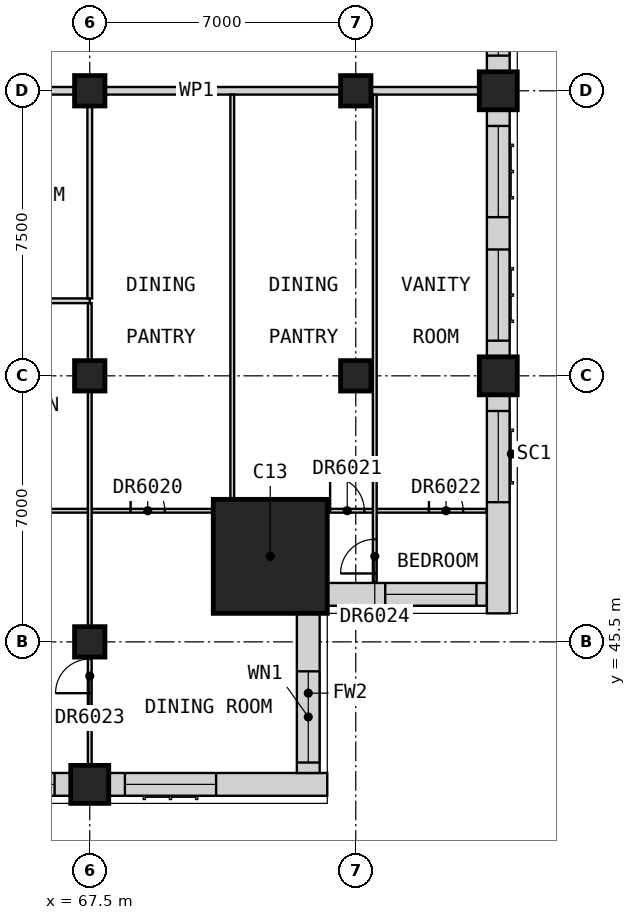
"""IFC4 building model, lengths in metres.
Left out: names, types, materials, properties, quantities, classifications, styles, units other than length and angle.
Written with IfcOpenShell. Run it as: python <this file> out.ifc"""

import sys

from ifc_helpers import new_model, si_unit, direction, frame, frame_2d, origin, origin_2d, place, context, subcontext, project, spatial, rectangle, extrude, element, fill, save


model = new_model("IFC4")
c1 = context("Model", 3, precision=1e-05, world=origin(), true_north=direction((0.0, 1.0)))
c2 = subcontext(c1, "Body", "Model", "MODEL_VIEW")
j1 = project(units=[si_unit("LENGTHUNIT", "METRE"), si_unit("PLANEANGLEUNIT", "RADIAN")], contexts=[c1])
p1 = place(None, origin())
s1 = spatial("IfcSite", under=j1, at=p1, CompositionType="ELEMENT")
p2 = place(p1, origin())
s2 = spatial("IfcBuilding", under=s1, at=p2, CompositionType="ELEMENT")
p3 = place(p2, frame((0.0, 0.0, 254.7)))
s3 = spatial("IfcBuildingStorey", under=s2, at=p3, CompositionType="ELEMENT", Elevation=254.7)
for number, where, z_axis, x_axis in (
    (1, (67.5, 41.75, 0.0), (0.0, 0.0, 1.0), (1.0, 0.0, 0.0)),
    (2, (78.25, 52.5, 0.0), (0.0, 0.0, 1.0), (1.0, 0.0, 0.0)),
    (3, (78.25, 60.0, 0.0), (0.0, 0.0, 1.0), (1.0, 0.0, 0.0)),
):
    element("IfcColumn", number, at=place(p3, frame(where, z_axis=z_axis, x_axis=x_axis)), inside=s3, PredefinedType="COLUMN", context=c2, shape_type="SweptSolid", body=[
        extrude(rectangle(XDim=1.0, YDim=1.0, at=origin_2d()), origin(), (0.0, 0.0, 1.0), 3.5),
    ])
for number, where, z_axis, x_axis in (
    (4, (67.5, 45.5, 0.0), (0.0, 0.0, 1.0), (1.0, 0.0, 0.0)),
    (5, (67.5, 52.5, 0.0), (0.0, 0.0, 1.0), (1.0, 0.0, 0.0)),
    (6, (67.5, 60.0, 0.0), (0.0, 0.0, 1.0), (1.0, 0.0, 0.0)),
    (7, (74.5, 52.5, 0.0), (0.0, 0.0, 1.0), (1.0, 0.0, 0.0)),
    (8, (74.5, 60.0, 0.0), (0.0, 0.0, 1.0), (1.0, 0.0, 0.0)),
):
    element("IfcColumn", number, at=place(p3, frame(where, z_axis=z_axis, x_axis=x_axis)), inside=s3, PredefinedType="COLUMN", context=c2, shape_type="SweptSolid", body=[
        extrude(rectangle(XDim=0.8, YDim=0.8, at=origin_2d()), origin(), (0.0, 0.0, 1.0), 3.5),
    ])
p4 = place(p3, frame((72.25, 47.75, 0.0), z_axis=(0.0, 0.0, 1.0), x_axis=(1.0, 0.0, 0.0)))
e9 = element("IfcColumn", 9, at=p4, inside=s3, PredefinedType="COLUMN", context=c2, shape_type="SweptSolid", body=[
    extrude(rectangle(XDim=3.0, YDim=3.0, at=origin_2d()), origin(), (0.0, 0.0, 1.0), 3.5),
])
p5 = place(p3, frame((60.5, 41.75, 0.0), z_axis=(0.0, 0.0, 1.0), x_axis=(1.0, 0.0, 0.0)))
e10 = element("IfcWall", 10, at=p5, inside=s3, PredefinedType="SOLIDWALL", context=c2, shape_type="SweptSolid", body=[
    extrude(rectangle(XDim=6.5, YDim=0.6, at=frame_2d((3.25, 0.0))), origin(), (0.0, 0.0, 1.0), 2.75),
])
p6 = place(p5, frame((0.425, 0.0, 0.8)))
e11 = element("IfcOpeningElement", 11, at=p6, cuts=e10, PredefinedType="OPENING", context=c2, shape_type="SweptSolid", body=[
    extrude(rectangle(XDim=2.4, YDim=1.8, at=frame_2d((1.2, 0.9))), frame((0.0, 0.31, 0.0), z_axis=(0.0, -1.0, 0.0), x_axis=(1.0, 0.0, 0.0)), (0.0, 0.0, 1.0), 0.62),
])
p7 = place(p5, frame((3.675, 0.0, 0.8)))
e12 = element("IfcOpeningElement", 12, at=p7, cuts=e10, PredefinedType="OPENING", context=c2, shape_type="SweptSolid", body=[
    extrude(rectangle(XDim=2.4, YDim=1.8, at=frame_2d((1.2, 0.9))), frame((0.0, 0.31, 0.0), z_axis=(0.0, -1.0, 0.0), x_axis=(1.0, 0.0, 0.0)), (0.0, 0.0, 1.0), 0.62),
])
p8 = place(p3, frame((68.0, 41.75, 0.0), z_axis=(0.0, 0.0, 1.0), x_axis=(1.0, 0.0, 0.0)))
e13 = element("IfcWall", 13, at=p8, inside=s3, PredefinedType="SOLIDWALL", context=c2, shape_type="SweptSolid", body=[
    extrude(rectangle(XDim=5.75, YDim=0.6, at=frame_2d((2.875, 0.0))), origin(), (0.0, 0.0, 1.0), 3.1),
])
p9 = place(p8, frame((0.425, 0.0, 0.8)))
e14 = element("IfcOpeningElement", 14, at=p9, cuts=e13, PredefinedType="OPENING", context=c2, shape_type="SweptSolid", body=[
    extrude(rectangle(XDim=2.4, YDim=1.8, at=frame_2d((1.2, 0.9))), frame((0.0, 0.31, 0.0), z_axis=(0.0, -1.0, 0.0), x_axis=(1.0, 0.0, 0.0)), (0.0, 0.0, 1.0), 0.62),
])
p10 = place(p3, frame((73.25, 42.05, 0.0), z_axis=(0.0, 0.0, 1.0), x_axis=(0.0, 1.0, 0.0)))
e15 = element("IfcWall", 15, at=p10, inside=s3, PredefinedType="SOLIDWALL", context=c2, shape_type="SweptSolid", body=[
    extrude(rectangle(XDim=4.2, YDim=0.6, at=frame_2d((2.1, 0.0))), origin(), (0.0, 0.0, 1.0), 3.1),
])
p11 = place(p10, frame((0.275, 0.0, 0.8)))
e16 = element("IfcOpeningElement", 16, at=p11, cuts=e15, PredefinedType="OPENING", context=c2, shape_type="SweptSolid", body=[
    extrude(rectangle(XDim=2.4, YDim=1.8, at=frame_2d((1.2, 0.9))), frame((0.0, 0.31, 0.0), z_axis=(0.0, -1.0, 0.0), x_axis=(1.0, 0.0, 0.0)), (0.0, 0.0, 1.0), 0.62),
])
p12 = place(p3, frame((73.75, 46.75, 0.0), z_axis=(0.0, 0.0, 1.0), x_axis=(1.0, 0.0, 0.0)))
e17 = element("IfcWall", 17, at=p12, inside=s3, PredefinedType="SOLIDWALL", context=c2, shape_type="SweptSolid", body=[
    extrude(rectangle(XDim=4.2, YDim=0.6, at=frame_2d((2.1, 0.0))), origin(), (0.0, 0.0, 1.0), 3.1),
])
p13 = place(p12, frame((1.525, 0.0, 0.8)))
e18 = element("IfcOpeningElement", 18, at=p13, cuts=e17, PredefinedType="OPENING", context=c2, shape_type="SweptSolid", body=[
    extrude(rectangle(XDim=2.4, YDim=1.8, at=frame_2d((1.2, 0.9))), frame((0.0, 0.31, 0.0), z_axis=(0.0, -1.0, 0.0), x_axis=(1.0, 0.0, 0.0)), (0.0, 0.0, 1.0), 0.62),
])
p14 = place(p3, frame((78.25, 46.25, 0.0), z_axis=(0.0, 0.0, 1.0), x_axis=(0.0, 1.0, 0.0)))
e19 = element("IfcWall", 19, at=p14, inside=s3, PredefinedType="SOLIDWALL", context=c2, shape_type="SweptSolid", body=[
    extrude(rectangle(XDim=5.75, YDim=0.6, at=frame_2d((2.875, 0.0))), origin(), (0.0, 0.0, 1.0), 3.1),
])
p15 = place(p14, frame((2.925, 0.0, 0.8)))
e20 = element("IfcOpeningElement", 20, at=p15, cuts=e19, PredefinedType="OPENING", context=c2, shape_type="SweptSolid", body=[
    extrude(rectangle(XDim=2.4, YDim=1.8, at=frame_2d((1.2, 0.9))), frame((0.0, 0.31, 0.0), z_axis=(0.0, -1.0, 0.0), x_axis=(1.0, 0.0, 0.0)), (0.0, 0.0, 1.0), 0.62),
])
p16 = place(p3, frame((78.25, 53.0, 0.0), z_axis=(0.0, 0.0, 1.0), x_axis=(0.0, 1.0, 0.0)))
e21 = element("IfcWall", 21, at=p16, inside=s3, PredefinedType="SOLIDWALL", context=c2, shape_type="SweptSolid", body=[
    extrude(rectangle(XDim=6.5, YDim=0.6, at=frame_2d((3.25, 0.0))), origin(), (0.0, 0.0, 1.0), 2.75),
])
p17 = place(p16, frame((0.425, 0.0, 0.8)))
e22 = element("IfcOpeningElement", 22, at=p17, cuts=e21, PredefinedType="OPENING", context=c2, shape_type="SweptSolid", body=[
    extrude(rectangle(XDim=2.4, YDim=1.8, at=frame_2d((1.2, 0.9))), frame((0.0, 0.31, 0.0), z_axis=(0.0, -1.0, 0.0), x_axis=(1.0, 0.0, 0.0)), (0.0, 0.0, 1.0), 0.62),
])
p18 = place(p16, frame((3.675, 0.0, 0.8)))
e23 = element("IfcOpeningElement", 23, at=p18, cuts=e21, PredefinedType="OPENING", context=c2, shape_type="SweptSolid", body=[
    extrude(rectangle(XDim=2.4, YDim=1.8, at=frame_2d((1.2, 0.9))), frame((0.0, 0.31, 0.0), z_axis=(0.0, -1.0, 0.0), x_axis=(1.0, 0.0, 0.0)), (0.0, 0.0, 1.0), 0.62),
])
p19 = place(p3, frame((78.25, 60.5, 0.0), z_axis=(0.0, 0.0, 1.0), x_axis=(0.0, 1.0, 0.0)))
e24 = element("IfcWall", 24, at=p19, inside=s3, PredefinedType="SOLIDWALL", context=c2, shape_type="SweptSolid", body=[
    extrude(rectangle(XDim=6.5, YDim=0.6, at=frame_2d((3.25, 0.0))), origin(), (0.0, 0.0, 1.0), 2.75),
])
p20 = place(p19, frame((0.425, 0.0, 0.8)))
e25 = element("IfcOpeningElement", 25, at=p20, cuts=e24, PredefinedType="OPENING", context=c2, shape_type="SweptSolid", body=[
    extrude(rectangle(XDim=2.4, YDim=1.8, at=frame_2d((1.2, 0.9))), frame((0.0, 0.31, 0.0), z_axis=(0.0, -1.0, 0.0), x_axis=(1.0, 0.0, 0.0)), (0.0, 0.0, 1.0), 0.62),
])
p21 = place(p19, frame((3.675, 0.0, 0.8)))
e26 = element("IfcOpeningElement", 26, at=p21, cuts=e24, PredefinedType="OPENING", context=c2, shape_type="SweptSolid", body=[
    extrude(rectangle(XDim=2.4, YDim=1.8, at=frame_2d((1.2, 0.9))), frame((0.0, 0.31, 0.0), z_axis=(0.0, -1.0, 0.0), x_axis=(1.0, 0.0, 0.0)), (0.0, 0.0, 1.0), 0.62),
])
p22 = place(p3, frame((61.875, 60.0, 0.0), z_axis=(0.0, 0.0, 1.0), x_axis=(1.0, 0.0, 0.0)))
e27 = element("IfcWall", 27, at=p22, inside=s3, PredefinedType="PARTITIONING", context=c2, shape_type="SweptSolid", body=[
    extrude(rectangle(XDim=16.875, YDim=0.2, at=frame_2d((8.438, 0.0))), origin(), (0.0, 0.0, 1.0), 3.1),
])
p23 = place(p3, frame((60.1, 48.95, 0.0), z_axis=(0.0, 0.0, 1.0), x_axis=(1.0, 0.0, 0.0)))
e28 = element("IfcWall", 28, at=p23, inside=s3, PredefinedType="PARTITIONING", context=c2, shape_type="SweptSolid", body=[
    extrude(rectangle(XDim=17.84, YDim=0.1, at=frame_2d((8.92, 0.0))), origin(), (0.0, 0.0, 1.0), 3.1),
])
p24 = place(p23, frame((1.325, 0.0, 0.0)))
e29 = element("IfcOpeningElement", 29, at=p24, cuts=e28, PredefinedType="OPENING", context=c2, shape_type="SweptSolid", body=[
    extrude(rectangle(XDim=0.9, YDim=2.1, at=frame_2d((0.45, 1.05))), frame((0.0, 0.06, 0.0), z_axis=(0.0, -1.0, 0.0), x_axis=(1.0, 0.0, 0.0)), (0.0, 0.0, 1.0), 0.12),
])
p25 = place(p23, frame((8.475, 0.0, 0.0)))
e30 = element("IfcOpeningElement", 30, at=p25, cuts=e28, PredefinedType="OPENING", context=c2, shape_type="SweptSolid", body=[
    extrude(rectangle(XDim=0.9, YDim=2.1, at=frame_2d((0.45, 1.05))), frame((0.0, 0.06, 0.0), z_axis=(0.0, -1.0, 0.0), x_axis=(1.0, 0.0, 0.0)), (0.0, 0.0, 1.0), 0.12),
])
p26 = place(p23, frame((13.725, 0.0, 0.0)))
e31 = element("IfcOpeningElement", 31, at=p26, cuts=e28, PredefinedType="OPENING", context=c2, shape_type="SweptSolid", body=[
    extrude(rectangle(XDim=0.9, YDim=2.1, at=frame_2d((0.45, 1.05))), frame((0.0, 0.06, 0.0), z_axis=(0.0, -1.0, 0.0), x_axis=(1.0, 0.0, 0.0)), (0.0, 0.0, 1.0), 0.12),
])
p27 = place(p23, frame((16.325, 0.0, 0.0)))
e32 = element("IfcOpeningElement", 32, at=p27, cuts=e28, PredefinedType="OPENING", context=c2, shape_type="SweptSolid", body=[
    extrude(rectangle(XDim=0.9, YDim=2.1, at=frame_2d((0.45, 1.05))), frame((0.0, 0.06, 0.0), z_axis=(0.0, -1.0, 0.0), x_axis=(1.0, 0.0, 0.0)), (0.0, 0.0, 1.0), 0.12),
])
p28 = place(p3, frame((67.5, 41.25, 0.0), z_axis=(0.0, 0.0, 1.0), x_axis=(0.0, 1.0, 0.0)))
e33 = element("IfcWall", 33, at=p28, inside=s3, PredefinedType="PARTITIONING", context=c2, shape_type="SweptSolid", body=[
    extrude(rectangle(XDim=13.163, YDim=0.1, at=frame_2d((6.581, 0.0))), origin(), (0.0, 0.0, 1.0), 3.1),
])
p29 = place(p28, frame((2.9, 0.0, 0.0)))
e34 = element("IfcOpeningElement", 34, at=p29, cuts=e33, PredefinedType="OPENING", context=c2, shape_type="SweptSolid", body=[
    extrude(rectangle(XDim=0.9, YDim=2.1, at=frame_2d((0.45, 1.05))), frame((0.0, 0.06, 0.0), z_axis=(0.0, -1.0, 0.0), x_axis=(1.0, 0.0, 0.0)), (0.0, 0.0, 1.0), 0.12),
])
p30 = place(p3, frame((71.25, 49.0, 0.0), z_axis=(0.0, 0.0, 1.0), x_axis=(0.0, 1.0, 0.0)))
e35 = element("IfcWall", 35, at=p30, inside=s3, PredefinedType="PARTITIONING", context=c2, shape_type="SweptSolid", body=[
    extrude(rectangle(XDim=10.9, YDim=0.1, at=frame_2d((5.45, 0.0))), origin(), (0.0, 0.0, 1.0), 3.1),
])
p31 = place(p3, frame((75.0, 47.06, 0.0), z_axis=(0.0, 0.0, 1.0), x_axis=(0.0, 1.0, 0.0)))
e36 = element("IfcWall", 36, at=p31, inside=s3, PredefinedType="PARTITIONING", context=c2, shape_type="SweptSolid", body=[
    extrude(rectangle(XDim=12.84, YDim=0.1, at=frame_2d((6.42, 0.0))), origin(), (0.0, 0.0, 1.0), 3.1),
])
p32 = place(p31, frame((0.24, 0.0, 0.0)))
e37 = element("IfcOpeningElement", 37, at=p32, cuts=e36, PredefinedType="OPENING", context=c2, shape_type="SweptSolid", body=[
    extrude(rectangle(XDim=0.9, YDim=2.1, at=frame_2d((0.45, 1.05))), frame((0.0, 0.06, 0.0), z_axis=(0.0, -1.0, 0.0), x_axis=(1.0, 0.0, 0.0)), (0.0, 0.0, 1.0), 0.12),
])
p33 = place(p3, frame((63.75, 54.475, 0.0), z_axis=(0.0, 0.0, 1.0), x_axis=(1.0, 0.0, 0.0)))
e38 = element("IfcWall", 38, at=p33, inside=s3, PredefinedType="PARTITIONING", context=c2, shape_type="SweptSolid", body=[
    extrude(rectangle(XDim=3.75, YDim=0.125, at=frame_2d((1.875, 0.0))), origin(), (0.0, 0.0, 1.0), 3.1),
])
p34 = place(p3, frame((67.5, 54.538, 0.0), z_axis=(0.0, 0.0, 1.0), x_axis=(0.0, 1.0, 0.0)))
e39 = element("IfcWall", 39, at=p34, inside=s3, PredefinedType="PARTITIONING", context=c2, shape_type="SweptSolid", body=[
    extrude(rectangle(XDim=5.362, YDim=0.125, at=frame_2d((2.681, 0.0))), origin(), (0.0, 0.0, 1.0), 3.1),
])
p35 = place(p7, origin())
e40 = element("IfcWindow", 40, at=p35, inside=s3, PartitioningType="SINGLE_PANEL", PredefinedType="WINDOW", context=c2, shape_type="SweptSolid", body=[
    extrude(rectangle(XDim=2.4, YDim=1.8, at=frame_2d((1.2, 0.9))), frame((0.0, -0.07, 0.0), z_axis=(0.0, -1.0, 0.0), x_axis=(1.0, 0.0, 0.0)), (0.0, 0.0, 1.0), 0.06),
])
fill(e12, e40)
p36 = place(p9, origin())
e41 = element("IfcWindow", 41, at=p36, inside=s3, PartitioningType="SINGLE_PANEL", PredefinedType="WINDOW", context=c2, shape_type="SweptSolid", body=[
    extrude(rectangle(XDim=2.4, YDim=1.8, at=frame_2d((1.2, 0.9))), frame((0.0, -0.07, 0.0), z_axis=(0.0, -1.0, 0.0), x_axis=(1.0, 0.0, 0.0)), (0.0, 0.0, 1.0), 0.06),
])
fill(e14, e41)
p37 = place(p11, origin())
e42 = element("IfcWindow", 42, at=p37, inside=s3, PartitioningType="SINGLE_PANEL", PredefinedType="WINDOW", context=c2, shape_type="SweptSolid", body=[
    extrude(rectangle(XDim=2.4, YDim=1.8, at=frame_2d((1.2, 0.9))), frame((0.0, -0.07, 0.0), z_axis=(0.0, -1.0, 0.0), x_axis=(1.0, 0.0, 0.0)), (0.0, 0.0, 1.0), 0.06),
])
fill(e16, e42)
p38 = place(p13, origin())
e43 = element("IfcWindow", 43, at=p38, inside=s3, PartitioningType="SINGLE_PANEL", PredefinedType="WINDOW", context=c2, shape_type="SweptSolid", body=[
    extrude(rectangle(XDim=2.4, YDim=1.8, at=frame_2d((1.2, 0.9))), frame((0.0, -0.07, 0.0), z_axis=(0.0, -1.0, 0.0), x_axis=(1.0, 0.0, 0.0)), (0.0, 0.0, 1.0), 0.06),
])
fill(e18, e43)
p39 = place(p15, origin())
e44 = element("IfcWindow", 44, at=p39, inside=s3, PartitioningType="SINGLE_PANEL", PredefinedType="WINDOW", context=c2, shape_type="SweptSolid", body=[
    extrude(rectangle(XDim=2.4, YDim=1.8, at=frame_2d((1.2, 0.9))), frame((0.0, -0.07, 0.0), z_axis=(0.0, -1.0, 0.0), x_axis=(1.0, 0.0, 0.0)), (0.0, 0.0, 1.0), 0.06),
])
fill(e20, e44)
p40 = place(p17, origin())
e45 = element("IfcWindow", 45, at=p40, inside=s3, PartitioningType="SINGLE_PANEL", PredefinedType="WINDOW", context=c2, shape_type="SweptSolid", body=[
    extrude(rectangle(XDim=2.4, YDim=1.8, at=frame_2d((1.2, 0.9))), frame((0.0, -0.07, 0.0), z_axis=(0.0, -1.0, 0.0), x_axis=(1.0, 0.0, 0.0)), (0.0, 0.0, 1.0), 0.06),
])
fill(e22, e45)
p41 = place(p18, origin())
e46 = element("IfcWindow", 46, at=p41, inside=s3, PartitioningType="SINGLE_PANEL", PredefinedType="WINDOW", context=c2, shape_type="SweptSolid", body=[
    extrude(rectangle(XDim=2.4, YDim=1.8, at=frame_2d((1.2, 0.9))), frame((0.0, -0.07, 0.0), z_axis=(0.0, -1.0, 0.0), x_axis=(1.0, 0.0, 0.0)), (0.0, 0.0, 1.0), 0.06),
])
fill(e23, e46)
p42 = place(p20, origin())
e47 = element("IfcWindow", 47, at=p42, inside=s3, PartitioningType="SINGLE_PANEL", PredefinedType="WINDOW", context=c2, shape_type="SweptSolid", body=[
    extrude(rectangle(XDim=2.4, YDim=1.8, at=frame_2d((1.2, 0.9))), frame((0.0, -0.07, 0.0), z_axis=(0.0, -1.0, 0.0), x_axis=(1.0, 0.0, 0.0)), (0.0, 0.0, 1.0), 0.06),
])
fill(e25, e47)
p43 = place(p25, origin())
e48 = element("IfcDoor", 48, at=p43, inside=s3, OperationType="SINGLE_SWING_LEFT", PredefinedType="DOOR", context=c2, shape_type="SweptSolid", body=[
    extrude(rectangle(XDim=0.9, YDim=2.1, at=frame_2d((0.45, 1.05))), frame((0.0, 0.025, 0.0), z_axis=(0.0, -1.0, 0.0), x_axis=(1.0, 0.0, 0.0)), (0.0, 0.0, 1.0), 0.05),
])
fill(e30, e48)
p44 = place(p26, origin())
e49 = element("IfcDoor", 49, at=p44, inside=s3, OperationType="SINGLE_SWING_RIGHT", PredefinedType="DOOR", context=c2, shape_type="SweptSolid", body=[
    extrude(rectangle(XDim=0.9, YDim=2.1, at=frame_2d((0.45, 1.05))), frame((0.0, 0.025, 0.0), z_axis=(0.0, -1.0, 0.0), x_axis=(1.0, 0.0, 0.0)), (0.0, 0.0, 1.0), 0.05),
])
fill(e31, e49)
p45 = place(p27, origin())
e50 = element("IfcDoor", 50, at=p45, inside=s3, OperationType="SINGLE_SWING_LEFT", PredefinedType="DOOR", context=c2, shape_type="SweptSolid", body=[
    extrude(rectangle(XDim=0.9, YDim=2.1, at=frame_2d((0.45, 1.05))), frame((0.0, 0.025, 0.0), z_axis=(0.0, -1.0, 0.0), x_axis=(1.0, 0.0, 0.0)), (0.0, 0.0, 1.0), 0.05),
])
fill(e32, e50)
p46 = place(p29, origin())
e51 = element("IfcDoor", 51, at=p46, inside=s3, OperationType="SINGLE_SWING_LEFT", PredefinedType="DOOR", context=c2, shape_type="SweptSolid", body=[
    extrude(rectangle(XDim=0.9, YDim=2.1, at=frame_2d((0.45, 1.05))), frame((0.0, 0.025, 0.0), z_axis=(0.0, -1.0, 0.0), x_axis=(1.0, 0.0, 0.0)), (0.0, 0.0, 1.0), 0.05),
])
fill(e34, e51)
p47 = place(p32, origin())
e52 = element("IfcDoor", 52, at=p47, inside=s3, OperationType="SINGLE_SWING_RIGHT", PredefinedType="DOOR", context=c2, shape_type="SweptSolid", body=[
    extrude(rectangle(XDim=0.9, YDim=2.1, at=frame_2d((0.45, 1.05))), frame((0.0, 0.025, 0.0), z_axis=(0.0, -1.0, 0.0), x_axis=(1.0, 0.0, 0.0)), (0.0, 0.0, 1.0), 0.05),
])
fill(e37, e52)
save(model, sys.argv[1])
